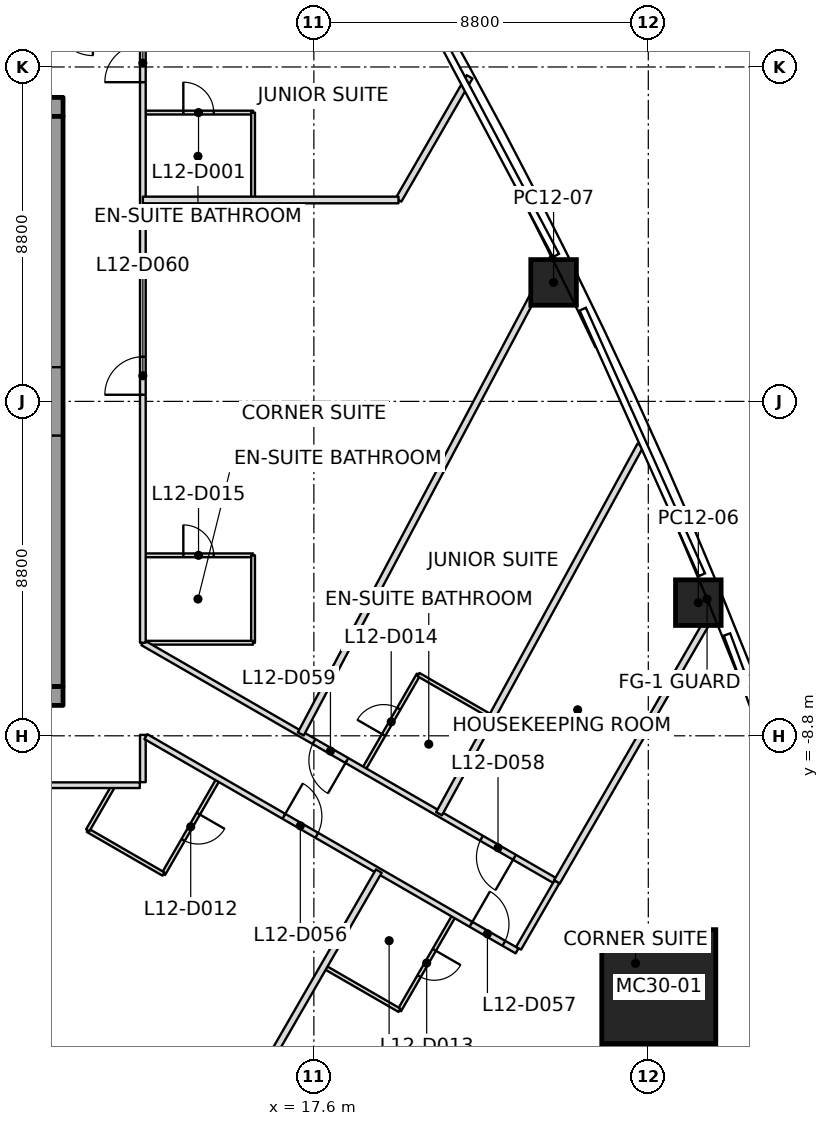
"""IFC4 building model, lengths in metres.
Left out: names, types, materials, properties, quantities, classifications, styles, units other than length and angle.
Written with IfcOpenShell. Run it as: python <this file> out.ifc"""

import sys

from ifc_helpers import new_model, si_unit, direction, frame, frame_2d, origin, origin_2d, place, context, subcontext, project, spatial, rectangle, extrude, element, fill, save


model = new_model("IFC4")
c1 = context("Model", 3, precision=1e-05, world=origin(), true_north=direction((0.0, 1.0)))
c2 = subcontext(c1, "Body", "Model", "MODEL_VIEW")
j1 = project(units=[si_unit("LENGTHUNIT", "METRE"), si_unit("PLANEANGLEUNIT", "RADIAN")], contexts=[c1])
p1 = place(None, origin())
s1 = spatial("IfcSite", under=j1, at=p1, CompositionType="ELEMENT")
p2 = place(p1, origin())
s2 = spatial("IfcBuilding", under=s1, at=p2, CompositionType="ELEMENT")
p3 = place(p2, frame((0.0, 0.0, 66.5)))
s3 = spatial("IfcBuildingStorey", under=s2, at=p3, CompositionType="ELEMENT", Elevation=66.5)
p4 = place(p3, frame((26.676, -15.401, 0.0), z_axis=(-0.030531956516, 0.017672925154, 0.999377539946), x_axis=(0.99953379114, 0.000539840661, 0.030527183636)))
e1 = element("IfcColumn", 1, at=p4, inside=s3, PredefinedType="COLUMN", context=c2, shape_type="SweptSolid", body=[
    extrude(rectangle(XDim=3.0, YDim=3.0, at=origin_2d()), origin(), (0.0, 0.0, 1.0), 3.702),
])
p5 = place(p3, frame((27.716, -5.296, 0.0), z_axis=(-0.019460655113, 0.011016709844, 0.999749926235), x_axis=(-0.381436993844, 0.924227098821, -0.017609359201)))
e2 = element("IfcColumn", 2, at=p5, inside=s3, PredefinedType="COLUMN", context=c2, shape_type="SweptSolid", body=[
    extrude(rectangle(XDim=1.2, YDim=1.2, at=origin_2d()), origin(), (0.0, 0.0, 1.0), 3.701),
])
p6 = place(p3, frame((23.908, 3.131, 0.0), z_axis=(-0.015240683228, 0.002309194428, 0.99988118754), x_axis=(-0.441667514031, 0.897135606394, -0.008804021245)))
e3 = element("IfcColumn", 3, at=p6, inside=s3, PredefinedType="COLUMN", context=c2, shape_type="SweptSolid", body=[
    extrude(rectangle(XDim=1.2, YDim=1.2, at=origin_2d()), origin(), (0.0, 0.0, 1.0), 3.7),
])
p7 = place(p3, frame((-11.0, -7.75, 0.0), z_axis=(0.0, 0.0, 1.0), x_axis=(1.0, 0.0, 0.0)))
e4 = element("IfcWall", 4, at=p7, inside=s3, PredefinedType="SHEAR", context=c2, shape_type="SweptSolid", body=[
    extrude(rectangle(XDim=22.0, YDim=0.5, at=frame_2d((11.0, 0.0))), origin(), (0.0, 0.0, 1.0), 3.7),
])
p8 = place(p7, frame((10.45, 0.0, 0.0)))
e5 = element("IfcOpeningElement", 5, at=p8, cuts=e4, PredefinedType="OPENING", context=c2, shape_type="SweptSolid", body=[
    extrude(rectangle(XDim=1.1, YDim=2.1, at=frame_2d((0.55, 1.05))), frame((0.0, 0.25, 0.0), z_axis=(0.0, -1.0, 0.0), x_axis=(1.0, 0.0, 0.0)), (0.0, 0.0, 1.0), 0.5),
])
p9 = place(p3, frame((-11.0, 7.75, 0.0), z_axis=(0.0, 0.0, 1.0), x_axis=(1.0, 0.0, 0.0)))
e6 = element("IfcWall", 6, at=p9, inside=s3, PredefinedType="SHEAR", context=c2, shape_type="SweptSolid", body=[
    extrude(rectangle(XDim=22.0, YDim=0.5, at=frame_2d((11.0, 0.0))), origin(), (0.0, 0.0, 1.0), 3.7),
])
p10 = place(p9, frame((10.45, 0.0, 0.0)))
e7 = element("IfcOpeningElement", 7, at=p10, cuts=e6, PredefinedType="OPENING", context=c2, shape_type="SweptSolid", body=[
    extrude(rectangle(XDim=1.1, YDim=2.1, at=frame_2d((0.55, 1.05))), frame((0.0, 0.25, 0.0), z_axis=(0.0, -1.0, 0.0), x_axis=(1.0, 0.0, 0.0)), (0.0, 0.0, 1.0), 0.5),
])
p11 = place(p3, frame((10.75, -7.5, 0.0), z_axis=(0.0, 0.0, 1.0), x_axis=(0.0, 1.0, 0.0)))
e8 = element("IfcWall", 8, at=p11, inside=s3, PredefinedType="SHEAR", context=c2, shape_type="SweptSolid", body=[
    extrude(rectangle(XDim=15.0, YDim=0.5, at=frame_2d((7.5, 0.0))), origin(), (0.0, 0.0, 1.0), 3.7),
])
p12 = place(p11, frame((6.6, 0.0, 0.0)))
e9 = element("IfcOpeningElement", 9, at=p12, cuts=e8, PredefinedType="OPENING", context=c2, shape_type="SweptSolid", body=[
    extrude(rectangle(XDim=1.8, YDim=2.1, at=frame_2d((0.9, 1.05))), frame((0.0, 0.25, 0.0), z_axis=(0.0, -1.0, 0.0), x_axis=(1.0, 0.0, 0.0)), (0.0, 0.0, 1.0), 0.5),
])
p13 = place(p3, frame((19.309, -12.361, 0.0), z_axis=(0.0, 0.0, 1.0), x_axis=(-0.499987367932, -0.86603269679, 0.0)))
e10 = element("IfcWall", 10, at=p13, inside=s3, PredefinedType="PARTITIONING", context=c2, shape_type="SweptSolid", body=[
    extrude(rectangle(XDim=12.418, YDim=0.175, at=frame_2d((6.209, 0.0))), origin(), (0.0, 0.0, 1.0), 2.934),
])
p14 = place(p3, frame((21.698, 8.542, 0.0), z_axis=(0.0, 0.0, 1.0), x_axis=(-0.499976540837, -0.866038947515, 0.0)))
e11 = element("IfcWall", 11, at=p14, inside=s3, PredefinedType="PARTITIONING", context=c2, shape_type="SweptSolid", body=[
    extrude(rectangle(XDim=3.743, YDim=0.175, at=frame_2d((1.872, 0.0))), origin(), (0.0, 0.0, 1.0), 2.934),
])
p15 = place(p3, frame((19.827, 5.3, 0.0), z_axis=(0.0, 0.0, 1.0), x_axis=(-1.0, 0.0, 0.0)))
e12 = element("IfcWall", 12, at=p15, inside=s3, PredefinedType="PARTITIONING", context=c2, shape_type="SweptSolid", body=[
    extrude(rectangle(XDim=6.727, YDim=0.175, at=frame_2d((3.363, 0.0))), origin(), (0.0, 0.0, 1.0), 3.093),
])
p16 = place(p3, frame((17.257, -8.751, 0.0), z_axis=(0.0, 0.0, 1.0), x_axis=(0.468490827691, 0.883468360707, 0.0)))
e13 = element("IfcWall", 13, at=p16, inside=s3, PredefinedType="PARTITIONING", context=c2, shape_type="SweptSolid", body=[
    extrude(rectangle(XDim=14.188, YDim=0.175, at=frame_2d((7.094, 0.0))), origin(), (0.0, 0.0, 1.0), 2.947),
])
p17 = place(p3, frame((26.192, -1.154, 0.0), z_axis=(0.0, 0.0, 1.0), x_axis=(-0.479475866819, -0.877555065587, 0.0)))
e14 = element("IfcWall", 14, at=p17, inside=s3, PredefinedType="PARTITIONING", context=c2, shape_type="SweptSolid", body=[
    extrude(rectangle(XDim=11.05, YDim=0.175, at=frame_2d((5.525, 0.0))), origin(), (0.0, 0.0, 1.0), 2.934),
])
p18 = place(p3, frame((23.997, -12.642, 0.0), z_axis=(0.0, 0.0, 1.0), x_axis=(0.49999045727, 0.866030913212, 0.0)))
e15 = element("IfcWall", 15, at=p18, inside=s3, PredefinedType="PARTITIONING", context=c2, shape_type="SweptSolid", body=[
    extrude(rectangle(XDim=8.543, YDim=0.175, at=frame_2d((4.271, 0.0))), origin(), (0.0, 0.0, 1.0), 2.934),
])
p19 = place(p3, frame((-13.02, -10.1, 0.0), z_axis=(0.0, 0.0, 1.0), x_axis=(1.0, 0.0, 0.0)))
e16 = element("IfcWall", 16, at=p19, inside=s3, PredefinedType="PARTITIONING", context=c2, shape_type="SweptSolid", body=[
    extrude(rectangle(XDim=26.04, YDim=0.15, at=frame_2d((13.02, 0.0))), origin(), (0.0, 0.0, 1.0), 2.947),
])
p20 = place(p19, frame((4.02, 0.0, 0.0)))
e17 = element("IfcOpeningElement", 17, at=p20, cuts=e16, PredefinedType="OPENING", context=c2, shape_type="SweptSolid", body=[
    extrude(rectangle(XDim=1.0, YDim=2.1, at=frame_2d((0.5, 1.05))), frame((0.0, 0.075, 0.0), z_axis=(0.0, -1.0, 0.0), x_axis=(1.0, 0.0, 0.0)), (0.0, 0.0, 1.0), 0.15),
])
p21 = place(p19, frame((7.02, 0.0, 0.0)))
e18 = element("IfcOpeningElement", 18, at=p21, cuts=e16, PredefinedType="OPENING", context=c2, shape_type="SweptSolid", body=[
    extrude(rectangle(XDim=1.0, YDim=2.1, at=frame_2d((0.5, 1.05))), frame((0.0, 0.075, 0.0), z_axis=(0.0, -1.0, 0.0), x_axis=(1.0, 0.0, 0.0)), (0.0, 0.0, 1.0), 0.15),
])
p22 = place(p19, frame((12.12, 0.0, 0.0)))
e19 = element("IfcOpeningElement", 19, at=p22, cuts=e16, PredefinedType="OPENING", context=c2, shape_type="SweptSolid", body=[
    extrude(rectangle(XDim=1.0, YDim=2.1, at=frame_2d((0.5, 1.05))), frame((0.0, 0.075, 0.0), z_axis=(0.0, -1.0, 0.0), x_axis=(1.0, 0.0, 0.0)), (0.0, 0.0, 1.0), 0.15),
])
p23 = place(p19, frame((16.62, 0.0, 0.0)))
e20 = element("IfcOpeningElement", 20, at=p23, cuts=e16, PredefinedType="OPENING", context=c2, shape_type="SweptSolid", body=[
    extrude(rectangle(XDim=1.0, YDim=2.1, at=frame_2d((0.5, 1.05))), frame((0.0, 0.075, 0.0), z_axis=(0.0, -1.0, 0.0), x_axis=(1.0, 0.0, 0.0)), (0.0, 0.0, 1.0), 0.15),
])
p24 = place(p19, frame((19.62, 0.0, 0.0)))
e21 = element("IfcOpeningElement", 21, at=p24, cuts=e16, PredefinedType="OPENING", context=c2, shape_type="SweptSolid", body=[
    extrude(rectangle(XDim=1.0, YDim=2.1, at=frame_2d((0.5, 1.05))), frame((0.0, 0.075, 0.0), z_axis=(0.0, -1.0, 0.0), x_axis=(1.0, 0.0, 0.0)), (0.0, 0.0, 1.0), 0.15),
])
p25 = place(p3, frame((13.1, -10.02, 0.0), z_axis=(0.0, 0.0, 1.0), x_axis=(0.0, 1.0, 0.0)))
e22 = element("IfcWall", 22, at=p25, inside=s3, PredefinedType="PARTITIONING", context=c2, shape_type="SweptSolid", body=[
    extrude(rectangle(XDim=1.244, YDim=0.15, at=frame_2d((0.622, 0.0))), origin(), (0.0, 0.0, 1.0), 2.797),
])
p26 = place(p3, frame((13.179, -8.822, 0.0), z_axis=(0.0, 0.0, 1.0), x_axis=(0.866025893256, -0.499999152209, 0.0)))
e23 = element("IfcWall", 23, at=p26, inside=s3, PredefinedType="PARTITIONING", context=c2, shape_type="SweptSolid", body=[
    extrude(rectangle(XDim=11.278, YDim=0.15, at=frame_2d((5.639, 0.0))), origin(), (0.0, 0.0, 1.0), 2.797),
])
p27 = place(p26, frame((4.193, 0.0, 0.0)))
e24 = element("IfcOpeningElement", 24, at=p27, cuts=e23, PredefinedType="OPENING", context=c2, shape_type="SweptSolid", body=[
    extrude(rectangle(XDim=1.0, YDim=2.1, at=frame_2d((0.5, 1.05))), frame((0.0, 0.075, 0.0), z_axis=(0.0, -1.0, 0.0), x_axis=(1.0, 0.0, 0.0)), (0.0, 0.0, 1.0), 0.15),
])
p28 = place(p26, frame((9.878, 0.0, 0.0)))
e25 = element("IfcOpeningElement", 25, at=p28, cuts=e23, PredefinedType="OPENING", context=c2, shape_type="SweptSolid", body=[
    extrude(rectangle(XDim=1.0, YDim=2.1, at=frame_2d((0.5, 1.05))), frame((0.0, 0.075, 0.0), z_axis=(0.0, -1.0, 0.0), x_axis=(1.0, 0.0, 0.0)), (0.0, 0.0, 1.0), 0.15),
])
p29 = place(p3, frame((22.987, -14.391, 0.0), z_axis=(0.0, 0.0, 1.0), x_axis=(0.500025864173, 0.866010470582, 0.0)))
e26 = element("IfcWall", 26, at=p29, inside=s3, PredefinedType="PARTITIONING", context=c2, shape_type="SweptSolid", body=[
    extrude(rectangle(XDim=2.02, YDim=0.15, at=frame_2d((1.01, 0.0))), origin(), (0.0, 0.0, 1.0), 2.797),
])
p30 = place(p3, frame((23.927, -12.602, 0.0), z_axis=(0.0, 0.0, 1.0), x_axis=(-0.866019736132, 0.500009816534, 0.0)))
e27 = element("IfcWall", 27, at=p30, inside=s3, PredefinedType="PARTITIONING", context=c2, shape_type="SweptSolid", body=[
    extrude(rectangle(XDim=12.502, YDim=0.15, at=frame_2d((6.251, 0.0))), origin(), (0.0, 0.0, 1.0), 2.947),
])
p31 = place(p30, frame((1.211, 0.0, 0.0)))
e28 = element("IfcOpeningElement", 28, at=p31, cuts=e27, PredefinedType="OPENING", context=c2, shape_type="SweptSolid", body=[
    extrude(rectangle(XDim=1.0, YDim=2.1, at=frame_2d((0.5, 1.05))), frame((0.0, 0.075, 0.0), z_axis=(0.0, -1.0, 0.0), x_axis=(1.0, 0.0, 0.0)), (0.0, 0.0, 1.0), 0.15),
])
p32 = place(p30, frame((6.302, 0.0, 0.0)))
e29 = element("IfcOpeningElement", 29, at=p32, cuts=e27, PredefinedType="OPENING", context=c2, shape_type="SweptSolid", body=[
    extrude(rectangle(XDim=1.0, YDim=2.1, at=frame_2d((0.5, 1.05))), frame((0.0, 0.075, 0.0), z_axis=(0.0, -1.0, 0.0), x_axis=(1.0, 0.0, 0.0)), (0.0, 0.0, 1.0), 0.15),
])
p33 = place(p3, frame((13.1, -6.351, 0.0), z_axis=(0.0, 0.0, 1.0), x_axis=(0.0, 1.0, 0.0)))
e30 = element("IfcWall", 30, at=p33, inside=s3, PredefinedType="PARTITIONING", context=c2, shape_type="SweptSolid", body=[
    extrude(rectangle(XDim=16.371, YDim=0.15, at=frame_2d((8.186, 0.0))), origin(), (0.0, 0.0, 1.0), 3.017),
])
p34 = place(p33, frame((14.751, 0.0, 0.0)))
e31 = element("IfcOpeningElement", 31, at=p34, cuts=e30, PredefinedType="OPENING", context=c2, shape_type="SweptSolid", body=[
    extrude(rectangle(XDim=1.0, YDim=2.1, at=frame_2d((0.5, 1.05))), frame((0.0, 0.075, 0.0), z_axis=(0.0, -1.0, 0.0), x_axis=(1.0, 0.0, 0.0)), (0.0, 0.0, 1.0), 0.15),
])
p35 = place(p33, frame((6.525, 0.0, 0.0)))
e32 = element("IfcOpeningElement", 32, at=p35, cuts=e30, PredefinedType="OPENING", context=c2, shape_type="SweptSolid", body=[
    extrude(rectangle(XDim=1.0, YDim=2.1, at=frame_2d((0.5, 1.05))), frame((0.0, 0.075, 0.0), z_axis=(0.0, -1.0, 0.0), x_axis=(1.0, 0.0, 0.0)), (0.0, 0.0, 1.0), 0.15),
])
p36 = place(p3, frame((15.077, -9.952, 0.0), z_axis=(0.0, 0.0, 1.0), x_axis=(-0.499999802827, -0.866025517622, 0.0)))
e33 = element("IfcWall", 33, at=p36, inside=s3, PredefinedType="PARTITIONING", context=c2, shape_type="SweptSolid", body=[
    extrude(rectangle(XDim=2.87, YDim=0.1, at=frame_2d((1.435, 0.0))), origin(), (0.0, 0.0, 1.0), 2.797),
])
p37 = place(p36, frame((1.035, 0.0, 0.0)))
e34 = element("IfcOpeningElement", 34, at=p37, cuts=e33, PredefinedType="OPENING", context=c2, shape_type="SweptSolid", body=[
    extrude(rectangle(XDim=0.8, YDim=2.1, at=frame_2d((0.4, 1.05))), frame((0.0, 0.05, 0.0), z_axis=(0.0, -1.0, 0.0), x_axis=(1.0, 0.0, 0.0)), (0.0, 0.0, 1.0), 0.1),
])
p38 = place(p3, frame((13.642, -12.437, 0.0), z_axis=(0.0, 0.0, 1.0), x_axis=(-0.866007057882, 0.500031774688, 0.0)))
e35 = element("IfcWall", 35, at=p38, inside=s3, PredefinedType="PARTITIONING", context=c2, shape_type="SweptSolid", body=[
    extrude(rectangle(XDim=2.3, YDim=0.1, at=frame_2d((1.15, 0.0))), origin(), (0.0, 0.0, 1.0), 3.017),
])
p39 = place(p3, frame((11.65, -11.287, 0.0), z_axis=(0.0, 0.0, 1.0), x_axis=(0.500049290317, 0.865996944136, 0.0)))
e36 = element("IfcWall", 36, at=p39, inside=s3, PredefinedType="PARTITIONING", context=c2, shape_type="SweptSolid", body=[
    extrude(rectangle(XDim=1.336, YDim=0.1, at=frame_2d((0.668, 0.0))), origin(), (0.0, 0.0, 1.0), 3.15),
])
p40 = place(p3, frame((13.13, -4.051, 0.0), z_axis=(0.0, 0.0, 1.0), x_axis=(1.0, 0.0, 0.0)))
e37 = element("IfcWall", 37, at=p40, inside=s3, PredefinedType="PARTITIONING", context=c2, shape_type="SweptSolid", body=[
    extrude(rectangle(XDim=2.87, YDim=0.1, at=frame_2d((1.435, 0.0))), origin(), (0.0, 0.0, 1.0), 3.15),
])
p41 = place(p40, frame((1.035, 0.0, 0.0)))
e38 = element("IfcOpeningElement", 38, at=p41, cuts=e37, PredefinedType="OPENING", context=c2, shape_type="SweptSolid", body=[
    extrude(rectangle(XDim=0.8, YDim=2.1, at=frame_2d((0.4, 1.05))), frame((0.0, 0.05, 0.0), z_axis=(0.0, -1.0, 0.0), x_axis=(1.0, 0.0, 0.0)), (0.0, 0.0, 1.0), 0.1),
])
p42 = place(p3, frame((16.0, -4.051, 0.0), z_axis=(0.0, 0.0, 1.0), x_axis=(0.0, -1.0, 0.0)))
e39 = element("IfcWall", 39, at=p42, inside=s3, PredefinedType="PARTITIONING", context=c2, shape_type="SweptSolid", body=[
    extrude(rectangle(XDim=2.3, YDim=0.1, at=frame_2d((1.15, 0.0))), origin(), (0.0, 0.0, 1.0), 2.947),
])
p43 = place(p3, frame((16.0, -6.351, 0.0), z_axis=(0.0, 0.0, 1.0), x_axis=(-1.0, 0.0, 0.0)))
e40 = element("IfcWall", 40, at=p43, inside=s3, PredefinedType="PARTITIONING", context=c2, shape_type="SweptSolid", body=[
    extrude(rectangle(XDim=2.84, YDim=0.1, at=frame_2d((1.42, 0.0))), origin(), (0.0, 0.0, 1.0), 2.947),
])
p44 = place(p3, frame((13.13, 7.6, 0.0), z_axis=(0.0, 0.0, 1.0), x_axis=(1.0, 0.0, 0.0)))
e41 = element("IfcWall", 41, at=p44, inside=s3, PredefinedType="PARTITIONING", context=c2, shape_type="SweptSolid", body=[
    extrude(rectangle(XDim=2.87, YDim=0.1, at=frame_2d((1.435, 0.0))), origin(), (0.0, 0.0, 1.0), 3.15),
])
p45 = place(p44, frame((1.035, 0.0, 0.0)))
e42 = element("IfcOpeningElement", 42, at=p45, cuts=e41, PredefinedType="OPENING", context=c2, shape_type="SweptSolid", body=[
    extrude(rectangle(XDim=0.8, YDim=2.1, at=frame_2d((0.4, 1.05))), frame((0.0, 0.05, 0.0), z_axis=(0.0, -1.0, 0.0), x_axis=(1.0, 0.0, 0.0)), (0.0, 0.0, 1.0), 0.1),
])
p46 = place(p3, frame((16.0, 7.6, 0.0), z_axis=(0.0, 0.0, 1.0), x_axis=(0.0, -1.0, 0.0)))
e43 = element("IfcWall", 43, at=p46, inside=s3, PredefinedType="PARTITIONING", context=c2, shape_type="SweptSolid", body=[
    extrude(rectangle(XDim=2.27, YDim=0.1, at=frame_2d((1.135, 0.0))), origin(), (0.0, 0.0, 1.0), 3.093),
])
p47 = place(p3, frame((21.286, -13.537, 0.0), z_axis=(0.0, 0.0, 1.0), x_axis=(-0.499999802827, -0.866025517622, 0.0)))
e44 = element("IfcWall", 44, at=p47, inside=s3, PredefinedType="PARTITIONING", context=c2, shape_type="SweptSolid", body=[
    extrude(rectangle(XDim=2.87, YDim=0.1, at=frame_2d((1.435, 0.0))), origin(), (0.0, 0.0, 1.0), 3.15),
])
p48 = place(p47, frame((1.035, 0.0, 0.0)))
e45 = element("IfcOpeningElement", 45, at=p48, cuts=e44, PredefinedType="OPENING", context=c2, shape_type="SweptSolid", body=[
    extrude(rectangle(XDim=0.8, YDim=2.1, at=frame_2d((0.4, 1.05))), frame((0.0, 0.05, 0.0), z_axis=(0.0, -1.0, 0.0), x_axis=(1.0, 0.0, 0.0)), (0.0, 0.0, 1.0), 0.1),
])
p49 = place(p3, frame((19.851, -16.022, 0.0), z_axis=(0.0, 0.0, 1.0), x_axis=(-0.866017224141, 0.500014167291, 0.0)))
e46 = element("IfcWall", 46, at=p49, inside=s3, PredefinedType="PARTITIONING", context=c2, shape_type="SweptSolid", body=[
    extrude(rectangle(XDim=2.27, YDim=0.1, at=frame_2d((1.135, 0.0))), origin(), (0.0, 0.0, 1.0), 3.15),
])
p50 = place(p3, frame((18.917, -9.675, 0.0), z_axis=(0.0, 0.0, 1.0), x_axis=(0.499972835562, 0.866041086612, 0.0)))
e47 = element("IfcWall", 47, at=p50, inside=s3, PredefinedType="PARTITIONING", context=c2, shape_type="SweptSolid", body=[
    extrude(rectangle(XDim=2.87, YDim=0.1, at=frame_2d((1.435, 0.0))), origin(), (0.0, 0.0, 1.0), 3.15),
])
p51 = place(p50, frame((1.035, 0.0, 0.0)))
e48 = element("IfcOpeningElement", 48, at=p51, cuts=e47, PredefinedType="OPENING", context=c2, shape_type="SweptSolid", body=[
    extrude(rectangle(XDim=0.8, YDim=2.1, at=frame_2d((0.4, 1.05))), frame((0.0, 0.05, 0.0), z_axis=(0.0, -1.0, 0.0), x_axis=(1.0, 0.0, 0.0)), (0.0, 0.0, 1.0), 0.1),
])
p52 = place(p3, frame((20.352, -7.189, 0.0), z_axis=(0.0, 0.0, 1.0), x_axis=(0.866017224141, -0.500014167291, 0.0)))
e49 = element("IfcWall", 49, at=p52, inside=s3, PredefinedType="PARTITIONING", context=c2, shape_type="SweptSolid", body=[
    extrude(rectangle(XDim=2.27, YDim=0.1, at=frame_2d((1.135, 0.0))), origin(), (0.0, 0.0, 1.0), 3.15),
])
p53 = place(p34, origin())
e50 = element("IfcDoor", 50, at=p53, inside=s3, OperationType="SINGLE_SWING_LEFT", PredefinedType="DOOR", context=c2, shape_type="SweptSolid", body=[
    extrude(rectangle(XDim=1.0, YDim=2.1, at=frame_2d((0.5, 1.05))), frame((0.0, 0.025, 0.0), z_axis=(0.0, -1.0, 0.0), x_axis=(1.0, 0.0, 0.0)), (0.0, 0.0, 1.0), 0.05),
])
fill(e31, e50)
p54 = place(p45, origin())
e51 = element("IfcDoor", 51, at=p54, inside=s3, OperationType="SINGLE_SWING_LEFT", PredefinedType="DOOR", context=c2, shape_type="SweptSolid", body=[
    extrude(rectangle(XDim=0.8, YDim=2.1, at=frame_2d((0.4, 1.05))), frame((0.0, 0.025, 0.0), z_axis=(0.0, -1.0, 0.0), x_axis=(1.0, 0.0, 0.0)), (0.0, 0.0, 1.0), 0.05),
])
fill(e42, e51)
p55 = place(p27, origin())
e52 = element("IfcDoor", 52, at=p55, inside=s3, OperationType="SINGLE_SWING_LEFT", PredefinedType="DOOR", context=c2, shape_type="SweptSolid", body=[
    extrude(rectangle(XDim=1.0, YDim=2.1, at=frame_2d((0.5, 1.05))), frame((0.0, 0.025, 0.0), z_axis=(0.0, -1.0, 0.0), x_axis=(1.0, 0.0, 0.0)), (0.0, 0.0, 1.0), 0.05),
])
fill(e24, e52)
p56 = place(p37, origin())
e53 = element("IfcDoor", 53, at=p56, inside=s3, OperationType="SINGLE_SWING_LEFT", PredefinedType="DOOR", context=c2, shape_type="SweptSolid", body=[
    extrude(rectangle(XDim=0.8, YDim=2.1, at=frame_2d((0.4, 1.05))), frame((0.0, 0.025, 0.0), z_axis=(0.0, -1.0, 0.0), x_axis=(1.0, 0.0, 0.0)), (0.0, 0.0, 1.0), 0.05),
])
fill(e34, e53)
p57 = place(p28, origin())
e54 = element("IfcDoor", 54, at=p57, inside=s3, OperationType="SINGLE_SWING_LEFT", PredefinedType="DOOR", context=c2, shape_type="SweptSolid", body=[
    extrude(rectangle(XDim=1.0, YDim=2.1, at=frame_2d((0.5, 1.05))), frame((0.0, 0.025, 0.0), z_axis=(0.0, -1.0, 0.0), x_axis=(1.0, 0.0, 0.0)), (0.0, 0.0, 1.0), 0.05),
])
fill(e25, e54)
p58 = place(p48, origin())
e55 = element("IfcDoor", 55, at=p58, inside=s3, OperationType="SINGLE_SWING_RIGHT", PredefinedType="DOOR", context=c2, shape_type="SweptSolid", body=[
    extrude(rectangle(XDim=0.8, YDim=2.1, at=frame_2d((0.4, 1.05))), frame((0.0, 0.025, 0.0), z_axis=(0.0, -1.0, 0.0), x_axis=(1.0, 0.0, 0.0)), (0.0, 0.0, 1.0), 0.05),
])
fill(e45, e55)
p59 = place(p31, origin())
e56 = element("IfcDoor", 56, at=p59, inside=s3, OperationType="SINGLE_SWING_LEFT", PredefinedType="DOOR", context=c2, shape_type="SweptSolid", body=[
    extrude(rectangle(XDim=1.0, YDim=2.1, at=frame_2d((0.5, 1.05))), frame((0.0, 0.025, 0.0), z_axis=(0.0, -1.0, 0.0), x_axis=(1.0, 0.0, 0.0)), (0.0, 0.0, 1.0), 0.05),
])
fill(e28, e56)
p60 = place(p32, origin())
e57 = element("IfcDoor", 57, at=p60, inside=s3, OperationType="SINGLE_SWING_LEFT", PredefinedType="DOOR", context=c2, shape_type="SweptSolid", body=[
    extrude(rectangle(XDim=1.0, YDim=2.1, at=frame_2d((0.5, 1.05))), frame((0.0, 0.025, 0.0), z_axis=(0.0, -1.0, 0.0), x_axis=(1.0, 0.0, 0.0)), (0.0, 0.0, 1.0), 0.05),
])
fill(e29, e57)
p61 = place(p51, origin())
e58 = element("IfcDoor", 58, at=p61, inside=s3, OperationType="SINGLE_SWING_RIGHT", PredefinedType="DOOR", context=c2, shape_type="SweptSolid", body=[
    extrude(rectangle(XDim=0.8, YDim=2.1, at=frame_2d((0.4, 1.05))), frame((0.0, 0.025, 0.0), z_axis=(0.0, -1.0, 0.0), x_axis=(1.0, 0.0, 0.0)), (0.0, 0.0, 1.0), 0.05),
])
fill(e48, e58)
p62 = place(p35, origin())
e59 = element("IfcDoor", 59, at=p62, inside=s3, OperationType="SINGLE_SWING_RIGHT", PredefinedType="DOOR", context=c2, shape_type="SweptSolid", body=[
    extrude(rectangle(XDim=1.0, YDim=2.1, at=frame_2d((0.5, 1.05))), frame((0.0, 0.025, 0.0), z_axis=(0.0, -1.0, 0.0), x_axis=(1.0, 0.0, 0.0)), (0.0, 0.0, 1.0), 0.05),
])
fill(e32, e59)
p63 = place(p41, origin())
e60 = element("IfcDoor", 60, at=p63, inside=s3, OperationType="SINGLE_SWING_RIGHT", PredefinedType="DOOR", context=c2, shape_type="SweptSolid", body=[
    extrude(rectangle(XDim=0.8, YDim=2.1, at=frame_2d((0.4, 1.05))), frame((0.0, 0.025, 0.0), z_axis=(0.0, -1.0, 0.0), x_axis=(1.0, 0.0, 0.0)), (0.0, 0.0, 1.0), 0.05),
])
fill(e38, e60)
p64 = place(p12, origin())
e61 = element("IfcDoor", 61, at=p64, inside=s3, OperationType="DOUBLE_DOOR_SINGLE_SWING", PredefinedType="DOOR", context=c2, shape_type="SweptSolid", body=[
    extrude(rectangle(XDim=1.8, YDim=2.1, at=frame_2d((0.9, 1.05))), frame((0.0, 0.025, 0.0), z_axis=(0.0, -1.0, 0.0), x_axis=(1.0, 0.0, 0.0)), (0.0, 0.0, 1.0), 0.05),
])
fill(e9, e61)
save(model, sys.argv[1])
